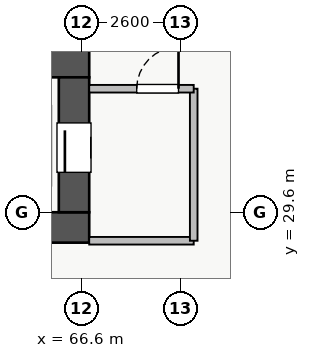
"""IFC4 building model, lengths in metres.
Left out: names, types, materials, properties, quantities, classifications, styles, units other than length and angle.
Written with IfcOpenShell. Run it as: python <this file> out.ifc"""

import sys

from ifc_helpers import new_model, si_unit, direction, frame, frame_2d, origin, place, context, subcontext, project, spatial, rectangle, extrude, source, transform, mapped, element, fill, save


model = new_model("IFC4")
c1 = context("Model", 3, precision=1e-05, world=origin(), true_north=direction((0.0, 1.0)))
c2 = subcontext(c1, "Body", "Model", "MODEL_VIEW")
j1 = project(units=[si_unit("LENGTHUNIT", "METRE"), si_unit("PLANEANGLEUNIT", "RADIAN")], contexts=[c1])
p1 = place(None, origin())
s1 = spatial("IfcSite", under=j1, at=p1, CompositionType="ELEMENT")
p2 = place(p1, origin())
s2 = spatial("IfcBuilding", under=s1, at=p2, CompositionType="ELEMENT")
p3 = place(p2, frame((0.0, 0.0, -9.6)))
s3 = spatial("IfcBuildingStorey", under=s2, at=p3, CompositionType="ELEMENT", Elevation=-9.6)
p4 = place(p3, frame((54.2, 29.2, 0.0), z_axis=(0.0, 0.0, 1.0), x_axis=(1.0, 0.0, 0.0)))
e1 = element("IfcWall", 1, at=p4, inside=s3, PredefinedType="SHEAR", context=c2, shape_type="SweptSolid", body=[
    extrude(rectangle(XDim=12.6, YDim=0.8, at=frame_2d((6.3, 0.0))), origin(), (0.0, 0.0, 1.0), 4.8),
])
p5 = place(p3, frame((54.2, 33.55, 0.0), z_axis=(0.0, 0.0, 1.0), x_axis=(1.0, 0.0, 0.0)))
e2 = element("IfcWall", 2, at=p5, inside=s3, PredefinedType="SHEAR", context=c2, shape_type="SweptSolid", body=[
    extrude(rectangle(XDim=12.6, YDim=0.8, at=frame_2d((6.3, 0.0))), origin(), (0.0, 0.0, 1.0), 4.8),
])
p6 = place(p5, frame((8.2, 0.0, 0.0)))
e3 = element("IfcOpeningElement", 3, at=p6, cuts=e2, PredefinedType="OPENING", context=c2, shape_type="SweptSolid", body=[
    extrude(rectangle(XDim=1.1, YDim=2.05, at=frame_2d((0.55, 1.025))), frame((0.0, 0.41, 0.0), z_axis=(0.0, -1.0, 0.0), x_axis=(1.0, 0.0, 0.0)), (0.0, 0.0, 1.0), 0.82),
])
p7 = place(p3, frame((66.4, 29.6, 0.0), z_axis=(0.0, 0.0, 1.0), x_axis=(0.0, 1.0, 0.0)))
e4 = element("IfcWall", 4, at=p7, inside=s3, PredefinedType="SHEAR", context=c2, shape_type="SweptSolid", body=[
    extrude(rectangle(XDim=3.55, YDim=0.8, at=frame_2d((1.775, 0.0))), origin(), (0.0, 0.0, 1.0), 4.8),
])
p8 = place(p7, frame((1.05, 0.0, 0.0)))
e5 = element("IfcOpeningElement", 5, at=p8, cuts=e4, PredefinedType="OPENING", context=c2, shape_type="SweptSolid", body=[
    extrude(rectangle(XDim=1.3, YDim=2.05, at=frame_2d((0.65, 1.025))), frame((0.0, 0.41, 0.0), z_axis=(0.0, -1.0, 0.0), x_axis=(1.0, 0.0, 0.0)), (0.0, 0.0, 1.0), 0.82),
])
p9 = place(p3, frame((66.8, 28.85, 0.0), z_axis=(0.0, 0.0, 1.0), x_axis=(1.0, 0.0, 0.0)))
e6 = element("IfcWall", 6, at=p9, inside=s3, PredefinedType="PARTITIONING", context=c2, shape_type="SweptSolid", body=[
    extrude(rectangle(XDim=2.75, YDim=0.2, at=frame_2d((1.375, 0.0))), origin(), (0.0, 0.0, 1.0), 4.58),
])
p10 = place(p3, frame((69.55, 28.85, 0.0), z_axis=(0.0, 0.0, 1.0), x_axis=(0.0, 1.0, 0.0)))
e7 = element("IfcWall", 7, at=p10, inside=s3, PredefinedType="PARTITIONING", context=c2, shape_type="SweptSolid", body=[
    extrude(rectangle(XDim=4.0, YDim=0.2, at=frame_2d((2.0, 0.0))), origin(), (0.0, 0.0, 1.0), 4.58),
])
p11 = place(p3, frame((66.8, 32.85, 0.0), z_axis=(0.0, 0.0, 1.0), x_axis=(1.0, 0.0, 0.0)))
e8 = element("IfcWall", 8, at=p11, inside=s3, PredefinedType="PARTITIONING", context=c2, shape_type="SweptSolid", body=[
    extrude(rectangle(XDim=2.75, YDim=0.2, at=frame_2d((1.375, 0.0))), origin(), (0.0, 0.0, 1.0), 4.58),
])
p12 = place(p11, frame((1.25, 0.0, 0.0)))
e9 = element("IfcOpeningElement", 9, at=p12, cuts=e8, PredefinedType="OPENING", context=c2, shape_type="SweptSolid", body=[
    extrude(rectangle(XDim=1.1, YDim=2.05, at=frame_2d((0.55, 1.025))), frame((0.0, 0.11, 0.0), z_axis=(0.0, -1.0, 0.0), x_axis=(1.0, 0.0, 0.0)), (0.0, 0.0, 1.0), 0.22),
])
m1 = source(origin(), c2, "Body", "SweptSolid", [
    extrude(rectangle(XDim=1.3, YDim=2.05, at=frame_2d((0.65, 1.025))), frame((0.0, 0.025, 0.0), z_axis=(0.0, -1.0, 0.0), x_axis=(1.0, 0.0, 0.0)), (0.0, 0.0, 1.0), 0.05),
])
p13 = place(p8, origin())
e10 = element("IfcDoor", 10, at=p13, inside=s3, OperationType="SLIDING_TO_LEFT", PredefinedType="DOOR", context=c2, shape_type="MappedRepresentation", body=[
    mapped(m1, transform((0.0, 0.0, 0.0), x_axis=(1.0, 0.0, 0.0), y_axis=(0.0, 1.0, 0.0), z_axis=(0.0, 0.0, 1.0), scale=1.0)),
])
fill(e5, e10)
m2 = source(origin(), c2, "Body", "SweptSolid", [
    extrude(rectangle(XDim=1.1, YDim=2.05, at=frame_2d((0.55, 1.025))), frame((0.0, 0.025, 0.0), z_axis=(0.0, -1.0, 0.0), x_axis=(1.0, 0.0, 0.0)), (0.0, 0.0, 1.0), 0.05),
])
p14 = place(p12, origin())
e11 = element("IfcDoor", 11, at=p14, inside=s3, OperationType="SINGLE_SWING_RIGHT", PredefinedType="DOOR", context=c2, shape_type="MappedRepresentation", body=[
    mapped(m2, transform((0.0, 0.0, 0.0), x_axis=(1.0, 0.0, 0.0), y_axis=(0.0, 1.0, 0.0), z_axis=(0.0, 0.0, 1.0), scale=1.0)),
])
fill(e9, e11)
save(model, sys.argv[1])
